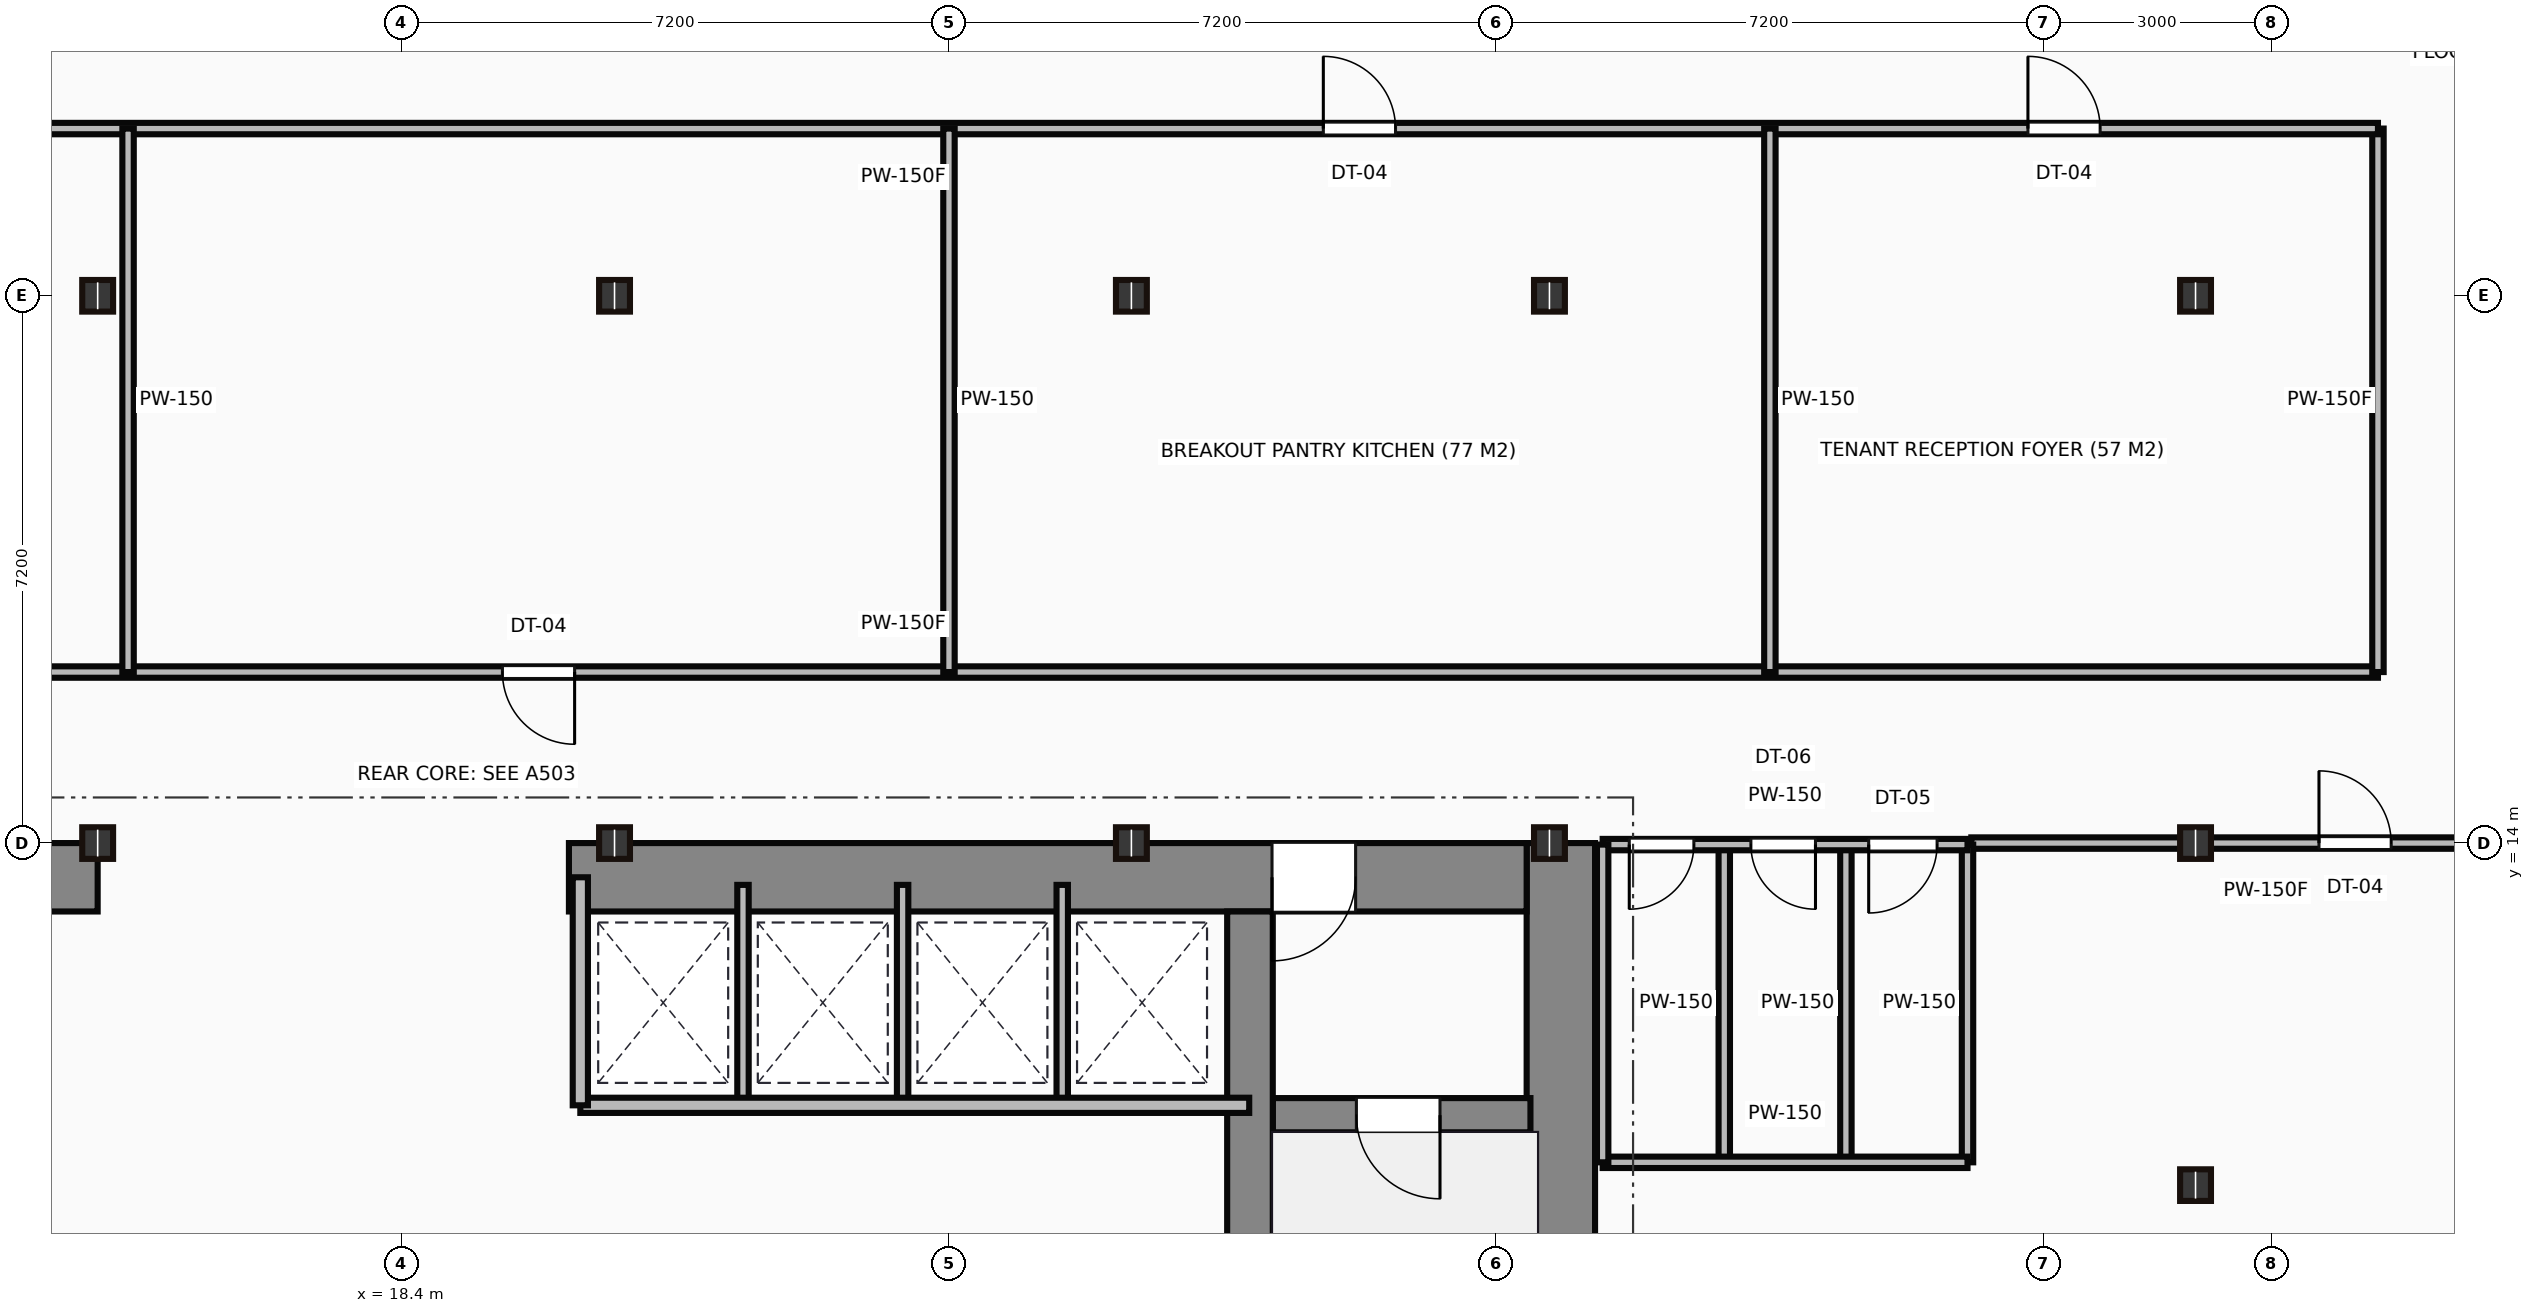
"""IFC4 building model, lengths in metres.
Left out: names, types, materials, properties, quantities, classifications, styles, units other than length and angle.
Written with IfcOpenShell. Run it as: python <this file> out.ifc"""

import sys

from ifc_helpers import new_model, si_unit, direction, frame, frame_2d, origin, origin_2d, place, context, subcontext, project, spatial, rectangle, i_section, extrude, source, transform, mapped, element, fill, save


model = new_model("IFC4")
c1 = context("Model", 3, precision=1e-05, world=origin(), true_north=direction((0.0, 1.0)))
c2 = subcontext(c1, "Body", "Model", "MODEL_VIEW")
j1 = project(units=[si_unit("LENGTHUNIT", "METRE"), si_unit("PLANEANGLEUNIT", "RADIAN")], contexts=[c1])
p1 = place(None, origin())
s1 = spatial("IfcSite", under=j1, at=p1, CompositionType="ELEMENT")
p2 = place(p1, origin())
s2 = spatial("IfcBuilding", under=s1, at=p2, CompositionType="ELEMENT")
p3 = place(p2, frame((0.0, 0.0, 69.0)))
s3 = spatial("IfcBuildingStorey", under=s2, at=p3, CompositionType="ELEMENT", Elevation=69.0)
m1 = source(origin(), c2, "Body", "SweptSolid", [
    extrude(rectangle(XDim=13.1, YDim=0.9, at=frame_2d((6.55, 0.0))), origin(), (0.0, 0.0, 1.0), 3.65),
])
p4 = place(p3, frame((33.65, 0.9, 0.0), z_axis=(0.0, 0.0, 1.0), x_axis=(0.0, 1.0, 0.0)))
e1 = element("IfcWall", 1, at=p4, inside=s3, PredefinedType="SHEAR", context=c2, shape_type="MappedRepresentation", body=[
    mapped(m1, transform((0.0, 0.0, 0.0))),
])
m2 = source(origin(), c2, "Body", "SweptSolid", [
    extrude(rectangle(XDim=9.1, YDim=0.9, at=frame_2d((4.55, 0.0))), origin(), (0.0, 0.0, 1.0), 3.65),
])
p5 = place(p3, frame((5.3, 13.55, 0.0), z_axis=(0.0, 0.0, 1.0), x_axis=(1.0, 0.0, 0.0)))
e2 = element("IfcWall", 2, at=p5, inside=s3, PredefinedType="SHEAR", context=c2, shape_type="MappedRepresentation", body=[
    mapped(m2, transform((0.0, 0.0, 0.0))),
])
p6 = place(p5, frame((4.1, 0.0, 0.0)))
e3 = element("IfcOpeningElement", 3, at=p6, cuts=e2, PredefinedType="OPENING", context=c2, shape_type="SweptSolid", body=[
    extrude(rectangle(XDim=1.1, YDim=2.15, at=frame_2d((0.55, 1.075))), frame((0.0, 0.46, 0.0), z_axis=(0.0, -1.0, 0.0), x_axis=(1.0, 0.0, 0.0)), (0.0, 0.0, 1.0), 0.92),
])
m3 = source(origin(), c2, "Body", "SweptSolid", [
    extrude(rectangle(XDim=12.6, YDim=0.9, at=frame_2d((6.3, 0.0))), origin(), (0.0, 0.0, 1.0), 3.65),
])
p7 = place(p3, frame((20.6, 13.55, 0.0), z_axis=(0.0, 0.0, 1.0), x_axis=(1.0, 0.0, 0.0)))
e4 = element("IfcWall", 4, at=p7, inside=s3, PredefinedType="SHEAR", context=c2, shape_type="MappedRepresentation", body=[
    mapped(m3, transform((0.0, 0.0, 0.0))),
])
p8 = place(p7, frame((9.25, 0.0, 0.0)))
e5 = element("IfcOpeningElement", 5, at=p8, cuts=e4, PredefinedType="OPENING", context=c2, shape_type="SweptSolid", body=[
    extrude(rectangle(XDim=1.1, YDim=2.15, at=frame_2d((0.55, 1.075))), frame((0.0, 0.46, 0.0), z_axis=(0.0, -1.0, 0.0), x_axis=(1.0, 0.0, 0.0)), (0.0, 0.0, 1.0), 0.92),
])
m4 = source(origin(), c2, "Body", "SweptSolid", [
    extrude(rectangle(XDim=12.2, YDim=0.6, at=frame_2d((6.1, 0.0))), origin(), (0.0, 0.0, 1.0), 3.65),
])
p9 = place(p3, frame((29.56, 0.9, 0.0), z_axis=(0.0, 0.0, 1.0), x_axis=(0.0, 1.0, 0.0)))
e6 = element("IfcWall", 6, at=p9, inside=s3, PredefinedType="SHEAR", context=c2, shape_type="MappedRepresentation", body=[
    mapped(m4, transform((0.0, 0.0, 0.0))),
])
m5 = source(origin(), c2, "Body", "SweptSolid", [
    extrude(rectangle(XDim=3.39, YDim=0.45, at=frame_2d((1.695, 0.0))), origin(), (0.0, 0.0, 1.0), 3.65),
])
p10 = place(p3, frame((29.86, 10.42, 0.0), z_axis=(0.0, 0.0, 1.0), x_axis=(1.0, 0.0, 0.0)))
e7 = element("IfcWall", 7, at=p10, inside=s3, PredefinedType="SHEAR", context=c2, shape_type="MappedRepresentation", body=[
    mapped(m5, transform((0.0, 0.0, 0.0))),
])
p11 = place(p10, frame((1.1, 0.0, 0.0)))
e8 = element("IfcOpeningElement", 8, at=p11, cuts=e7, PredefinedType="OPENING", context=c2, shape_type="SweptSolid", body=[
    extrude(rectangle(XDim=1.1, YDim=2.15, at=frame_2d((0.55, 1.075))), frame((0.0, 0.235, 0.0), z_axis=(0.0, -1.0, 0.0), x_axis=(1.0, 0.0, 0.0)), (0.0, 0.0, 1.0), 0.47),
])
m6 = source(origin(), c2, "Body", "SweptSolid", [
    extrude(i_section(OverallWidth=0.406, OverallDepth=0.416, WebThickness=0.03, FlangeThickness=0.048, at=origin_2d()), origin(), (0.0, 0.0, 1.0), 3.65),
])
for number, where, z_axis, x_axis in (
    (9, (14.4, 14.0, 0.0), (0.0, 0.0, 1.0), (1.0, 0.0, 0.0)),
    (10, (14.4, 21.2, 0.0), (0.0, 0.0, 1.0), (1.0, 0.0, 0.0)),
    (11, (21.2, 14.0, 0.0), (0.0, 0.0, 1.0), (1.0, 0.0, 0.0)),
    (12, (21.2, 21.2, 0.0), (0.0, 0.0, 1.0), (1.0, 0.0, 0.0)),
    (13, (28.0, 14.0, 0.0), (0.0, 0.0, 1.0), (1.0, 0.0, 0.0)),
    (14, (28.0, 21.2, 0.0), (0.0, 0.0, 1.0), (1.0, 0.0, 0.0)),
    (15, (33.5, 14.0, 0.0), (0.0, 0.0, 1.0), (1.0, 0.0, 0.0)),
    (16, (33.5, 21.2, 0.0), (0.0, 0.0, 1.0), (1.0, 0.0, 0.0)),
    (17, (42.0, 9.5, 0.0), (0.0, 0.0, 1.0), (1.0, 0.0, 0.0)),
    (18, (42.0, 14.0, 0.0), (0.0, 0.0, 1.0), (1.0, 0.0, 0.0)),
    (19, (42.0, 21.2, 0.0), (0.0, 0.0, 1.0), (1.0, 0.0, 0.0)),
):
    element("IfcColumn", number, at=place(p3, frame(where, z_axis=z_axis, x_axis=x_axis)), inside=s3, PredefinedType="COLUMN", context=c2, shape_type="MappedRepresentation", body=[
        mapped(m6, transform((0.0, 0.0, 0.0))),
    ])
m7 = source(origin(), c2, "Body", "SweptSolid", [
    extrude(rectangle(XDim=8.8, YDim=0.2, at=frame_2d((4.4, 0.0))), origin(), (0.0, 0.0, 1.0), 3.4),
])
p12 = place(p3, frame((20.75, 10.55, 0.0), z_axis=(0.0, 0.0, 1.0), x_axis=(1.0, 0.0, 0.0)))
e20 = element("IfcWall", 20, at=p12, inside=s3, PredefinedType="PARTITIONING", context=c2, shape_type="MappedRepresentation", body=[
    mapped(m7, transform((0.0, 0.0, 0.0))),
])
m8 = source(origin(), c2, "Body", "SweptSolid", [
    extrude(rectangle(XDim=3.0, YDim=0.2, at=frame_2d((1.5, 0.0))), origin(), (0.0, 0.0, 1.0), 3.4),
])
p13 = place(p3, frame((20.75, 10.55, 0.0), z_axis=(0.0, 0.0, 1.0), x_axis=(0.0, 1.0, 0.0)))
e21 = element("IfcWall", 21, at=p13, inside=s3, PredefinedType="PARTITIONING", context=c2, shape_type="MappedRepresentation", body=[
    mapped(m8, transform((0.0, 0.0, 0.0))),
])
m9 = source(origin(), c2, "Body", "SweptSolid", [
    extrude(rectangle(XDim=2.85, YDim=0.15, at=frame_2d((1.425, 0.0))), origin(), (0.0, 0.0, 1.0), 3.4),
])
for number, where, z_axis, x_axis in (
    (22, (22.89, 10.6, 0.0), (0.0, 0.0, 1.0), (0.0, 1.0, 0.0)),
    (23, (24.99, 10.6, 0.0), (0.0, 0.0, 1.0), (0.0, 1.0, 0.0)),
    (24, (27.09, 10.6, 0.0), (0.0, 0.0, 1.0), (0.0, 1.0, 0.0)),
):
    element("IfcWall", number, at=place(p3, frame(where, z_axis=z_axis, x_axis=x_axis)), inside=s3, PredefinedType="PARTITIONING", context=c2, shape_type="MappedRepresentation", body=[
        mapped(m9, transform((0.0, 0.0, 0.0))),
    ])
m10 = source(origin(), c2, "Body", "SweptSolid", [
    extrude(rectangle(XDim=4.8, YDim=0.15, at=frame_2d((2.4, 0.0))), origin(), (0.0, 0.0, 1.0), 2.625),
])
p14 = place(p3, frame((34.2, 13.98, 0.0), z_axis=(0.0, 0.0, 1.0), x_axis=(1.0, 0.0, 0.0)))
e25 = element("IfcWall", 25, at=p14, inside=s3, PredefinedType="PARTITIONING", context=c2, shape_type="MappedRepresentation", body=[
    mapped(m10, transform((0.0, 0.0, 0.0))),
])
p15 = place(p14, frame((0.35, 0.0, 0.0)))
e26 = element("IfcOpeningElement", 26, at=p15, cuts=e25, PredefinedType="OPENING", context=c2, shape_type="SweptSolid", body=[
    extrude(rectangle(XDim=0.85, YDim=2.1, at=frame_2d((0.425, 1.05))), frame((0.0, 0.085, 0.0), z_axis=(0.0, -1.0, 0.0), x_axis=(1.0, 0.0, 0.0)), (0.0, 0.0, 1.0), 0.17),
])
p16 = place(p14, frame((1.95, 0.0, 0.0)))
e27 = element("IfcOpeningElement", 27, at=p16, cuts=e25, PredefinedType="OPENING", context=c2, shape_type="SweptSolid", body=[
    extrude(rectangle(XDim=0.85, YDim=2.1, at=frame_2d((0.425, 1.05))), frame((0.0, 0.085, 0.0), z_axis=(0.0, -1.0, 0.0), x_axis=(1.0, 0.0, 0.0)), (0.0, 0.0, 1.0), 0.17),
])
p17 = place(p14, frame((3.5, 0.0, 0.0)))
e28 = element("IfcOpeningElement", 28, at=p17, cuts=e25, PredefinedType="OPENING", context=c2, shape_type="SweptSolid", body=[
    extrude(rectangle(XDim=0.9, YDim=2.1, at=frame_2d((0.45, 1.05))), frame((0.0, 0.085, 0.0), z_axis=(0.0, -1.0, 0.0), x_axis=(1.0, 0.0, 0.0)), (0.0, 0.0, 1.0), 0.17),
])
m11 = source(origin(), c2, "Body", "SweptSolid", [
    extrude(rectangle(XDim=4.8, YDim=0.15, at=frame_2d((2.4, 0.0))), origin(), (0.0, 0.0, 1.0), 3.4),
])
p18 = place(p3, frame((34.2, 9.8, 0.0), z_axis=(0.0, 0.0, 1.0), x_axis=(1.0, 0.0, 0.0)))
e29 = element("IfcWall", 29, at=p18, inside=s3, PredefinedType="PARTITIONING", context=c2, shape_type="MappedRepresentation", body=[
    mapped(m11, transform((0.0, 0.0, 0.0))),
])
m12 = source(origin(), c2, "Body", "SweptSolid", [
    extrude(rectangle(XDim=4.18, YDim=0.15, at=frame_2d((2.09, 0.0))), origin(), (0.0, 0.0, 1.0), 3.4),
])
for number, where, z_axis, x_axis in (
    (30, (39.0, 9.8, 0.0), (0.0, 0.0, 1.0), (0.0, 1.0, 0.0)),
    (31, (34.2, 9.8, 0.0), (0.0, 0.0, 1.0), (0.0, 1.0, 0.0)),
    (32, (35.8, 9.8, 0.0), (0.0, 0.0, 1.0), (0.0, 1.0, 0.0)),
    (33, (37.4, 9.8, 0.0), (0.0, 0.0, 1.0), (0.0, 1.0, 0.0)),
):
    element("IfcWall", number, at=place(p3, frame(where, z_axis=z_axis, x_axis=x_axis)), inside=s3, PredefinedType="PARTITIONING", context=c2, shape_type="MappedRepresentation", body=[
        mapped(m12, transform((0.0, 0.0, 0.0))),
    ])
m13 = source(origin(), c2, "Body", "SweptSolid", [
    extrude(rectangle(XDim=7.75, YDim=0.15, at=frame_2d((3.875, 0.0))), origin(), (0.0, 0.0, 1.0), 2.625),
])
p19 = place(p3, frame((46.8, 14.0, 0.0), z_axis=(0.0, 0.0, 1.0), x_axis=(-1.0, 0.0, 0.0)))
e34 = element("IfcWall", 34, at=p19, inside=s3, PredefinedType="PARTITIONING", context=c2, shape_type="MappedRepresentation", body=[
    mapped(m13, transform((0.0, 0.0, 0.0))),
])
p20 = place(p19, frame((2.226, 0.0, 0.0)))
e35 = element("IfcOpeningElement", 35, at=p20, cuts=e34, PredefinedType="OPENING", context=c2, shape_type="SweptSolid", body=[
    extrude(rectangle(XDim=0.95, YDim=2.15, at=frame_2d((0.475, 1.075))), frame((0.0, 0.085, 0.0), z_axis=(0.0, -1.0, 0.0), x_axis=(1.0, 0.0, 0.0)), (0.0, 0.0, 1.0), 0.17),
])
m14 = source(origin(), c2, "Body", "SweptSolid", [
    extrude(rectangle(XDim=38.8, YDim=0.15, at=frame_2d((19.4, 0.0))), origin(), (0.0, 0.0, 1.0), 3.4),
])
p21 = place(p3, frame((5.6, 16.25, 0.0), z_axis=(0.0, 0.0, 1.0), x_axis=(1.0, 0.0, 0.0)))
e36 = element("IfcWall", 36, at=p21, inside=s3, PredefinedType="PARTITIONING", context=c2, shape_type="MappedRepresentation", body=[
    mapped(m14, transform((0.0, 0.0, 0.0))),
])
p22 = place(p21, frame((4.255, 0.0, 0.0)))
e37 = element("IfcOpeningElement", 37, at=p22, cuts=e36, PredefinedType="OPENING", context=c2, shape_type="SweptSolid", body=[
    extrude(rectangle(XDim=0.95, YDim=2.15, at=frame_2d((0.475, 1.075))), frame((0.0, 0.085, 0.0), z_axis=(0.0, -1.0, 0.0), x_axis=(1.0, 0.0, 0.0)), (0.0, 0.0, 1.0), 0.17),
])
p23 = place(p21, frame((14.125, 0.0, 0.0)))
e38 = element("IfcOpeningElement", 38, at=p23, cuts=e36, PredefinedType="OPENING", context=c2, shape_type="SweptSolid", body=[
    extrude(rectangle(XDim=0.95, YDim=2.15, at=frame_2d((0.475, 1.075))), frame((0.0, 0.085, 0.0), z_axis=(0.0, -1.0, 0.0), x_axis=(1.0, 0.0, 0.0)), (0.0, 0.0, 1.0), 0.17),
])
m15 = source(origin(), c2, "Body", "SweptSolid", [
    extrude(rectangle(XDim=7.15, YDim=0.15, at=frame_2d((3.575, 0.0))), origin(), (0.0, 0.0, 1.0), 3.4),
])
p24 = place(p3, frame((44.4, 16.25, 0.0), z_axis=(0.0, 0.0, 1.0), x_axis=(0.0, 1.0, 0.0)))
e39 = element("IfcWall", 39, at=p24, inside=s3, PredefinedType="PARTITIONING", context=c2, shape_type="MappedRepresentation", body=[
    mapped(m15, transform((0.0, 0.0, 0.0))),
])
m16 = source(origin(), c2, "Body", "SweptSolid", [
    extrude(rectangle(XDim=38.8, YDim=0.15, at=frame_2d((19.4, 0.0))), origin(), (0.0, 0.0, 1.0), 2.978),
])
p25 = place(p3, frame((44.4, 23.4, 0.0), z_axis=(0.0, 0.0, 1.0), x_axis=(-1.0, 0.0, 0.0)))
e40 = element("IfcWall", 40, at=p25, inside=s3, PredefinedType="PARTITIONING", context=c2, shape_type="MappedRepresentation", body=[
    mapped(m16, transform((0.0, 0.0, 0.0))),
])
p26 = place(p25, frame((12.925, 0.0, 0.0)))
e41 = element("IfcOpeningElement", 41, at=p26, cuts=e40, PredefinedType="OPENING", context=c2, shape_type="SweptSolid", body=[
    extrude(rectangle(XDim=0.95, YDim=2.15, at=frame_2d((0.475, 1.075))), frame((0.0, 0.085, 0.0), z_axis=(0.0, -1.0, 0.0), x_axis=(1.0, 0.0, 0.0)), (0.0, 0.0, 1.0), 0.17),
])
p27 = place(p25, frame((3.655, 0.0, 0.0)))
e42 = element("IfcOpeningElement", 42, at=p27, cuts=e40, PredefinedType="OPENING", context=c2, shape_type="SweptSolid", body=[
    extrude(rectangle(XDim=0.95, YDim=2.15, at=frame_2d((0.475, 1.075))), frame((0.0, 0.085, 0.0), z_axis=(0.0, -1.0, 0.0), x_axis=(1.0, 0.0, 0.0)), (0.0, 0.0, 1.0), 0.17),
])
for number, where, z_axis, x_axis in (
    (43, (14.8, 23.4, 0.0), (0.0, 0.0, 1.0), (0.0, -1.0, 0.0)),
    (44, (25.6, 23.4, 0.0), (0.0, 0.0, 1.0), (0.0, -1.0, 0.0)),
    (45, (36.4, 23.4, 0.0), (0.0, 0.0, 1.0), (0.0, -1.0, 0.0)),
):
    element("IfcWall", number, at=place(p3, frame(where, z_axis=z_axis, x_axis=x_axis)), inside=s3, PredefinedType="PARTITIONING", context=c2, shape_type="MappedRepresentation", body=[
        mapped(m15, transform((0.0, 0.0, 0.0))),
    ])
m17 = source(origin(), c2, "Body", "SweptSolid", [
    extrude(rectangle(XDim=1.1, YDim=2.15, at=frame_2d((0.55, 1.075))), frame((0.0, 0.025, 0.0), z_axis=(0.0, -1.0, 0.0), x_axis=(1.0, 0.0, 0.0)), (0.0, 0.0, 1.0), 0.05),
])
p28 = place(p11, frame((1.1, 0.0, 0.0), z_axis=(0.0, 0.0, 1.0), x_axis=(-1.0, 0.0, 0.0)))
e46 = element("IfcDoor", 46, at=p28, inside=s3, OperationType="SINGLE_SWING_RIGHT", PredefinedType="DOOR", context=c2, shape_type="MappedRepresentation", body=[
    mapped(m17, transform((0.0, 0.0, 0.0))),
])
fill(e8, e46)
p29 = place(p8, origin())
e47 = element("IfcDoor", 47, at=p29, inside=s3, OperationType="SINGLE_SWING_LEFT", PredefinedType="DOOR", context=c2, shape_type="MappedRepresentation", body=[
    mapped(m17, transform((0.0, 0.0, 0.0))),
])
fill(e5, e47)
m18 = source(origin(), c2, "Body", "SweptSolid", [
    extrude(rectangle(XDim=0.85, YDim=2.1, at=frame_2d((0.425, 1.05))), frame((0.0, 0.025, 0.0), z_axis=(0.0, -1.0, 0.0), x_axis=(1.0, 0.0, 0.0)), (0.0, 0.0, 1.0), 0.05),
])
p30 = place(p15, frame((0.85, 0.0, 0.0), z_axis=(0.0, 0.0, 1.0), x_axis=(-1.0, 0.0, 0.0)))
e48 = element("IfcDoor", 48, at=p30, inside=s3, OperationType="SINGLE_SWING_LEFT", PredefinedType="DOOR", context=c2, shape_type="MappedRepresentation", body=[
    mapped(m18, transform((0.0, 0.0, 0.0))),
])
fill(e26, e48)
p31 = place(p16, frame((0.85, 0.0, 0.0), z_axis=(0.0, 0.0, 1.0), x_axis=(-1.0, 0.0, 0.0)))
e49 = element("IfcDoor", 49, at=p31, inside=s3, OperationType="SINGLE_SWING_RIGHT", PredefinedType="DOOR", context=c2, shape_type="MappedRepresentation", body=[
    mapped(m18, transform((0.0, 0.0, 0.0))),
])
fill(e27, e49)
m19 = source(origin(), c2, "Body", "SweptSolid", [
    extrude(rectangle(XDim=0.9, YDim=2.1, at=frame_2d((0.45, 1.05))), frame((0.0, 0.025, 0.0), z_axis=(0.0, -1.0, 0.0), x_axis=(1.0, 0.0, 0.0)), (0.0, 0.0, 1.0), 0.05),
])
p32 = place(p17, frame((0.9, 0.0, 0.0), z_axis=(0.0, 0.0, 1.0), x_axis=(-1.0, 0.0, 0.0)))
e50 = element("IfcDoor", 50, at=p32, inside=s3, OperationType="SINGLE_SWING_LEFT", PredefinedType="DOOR", context=c2, shape_type="MappedRepresentation", body=[
    mapped(m19, transform((0.0, 0.0, 0.0))),
])
fill(e28, e50)
m20 = source(origin(), c2, "Body", "SweptSolid", [
    extrude(rectangle(XDim=0.95, YDim=2.15, at=frame_2d((0.475, 1.075))), frame((0.0, 0.025, 0.0), z_axis=(0.0, -1.0, 0.0), x_axis=(1.0, 0.0, 0.0)), (0.0, 0.0, 1.0), 0.05),
])
p33 = place(p23, origin())
e51 = element("IfcDoor", 51, at=p33, inside=s3, OperationType="SINGLE_SWING_RIGHT", PredefinedType="DOOR", context=c2, shape_type="MappedRepresentation", body=[
    mapped(m20, transform((0.0, 0.0, 0.0))),
])
fill(e38, e51)
p34 = place(p26, origin())
e52 = element("IfcDoor", 52, at=p34, inside=s3, OperationType="SINGLE_SWING_RIGHT", PredefinedType="DOOR", context=c2, shape_type="MappedRepresentation", body=[
    mapped(m20, transform((0.0, 0.0, 0.0))),
])
fill(e41, e52)
p35 = place(p27, origin())
e53 = element("IfcDoor", 53, at=p35, inside=s3, OperationType="SINGLE_SWING_RIGHT", PredefinedType="DOOR", context=c2, shape_type="MappedRepresentation", body=[
    mapped(m20, transform((0.0, 0.0, 0.0))),
])
fill(e42, e53)
p36 = place(p20, origin())
e54 = element("IfcDoor", 54, at=p36, inside=s3, OperationType="SINGLE_SWING_RIGHT", PredefinedType="DOOR", context=c2, shape_type="MappedRepresentation", body=[
    mapped(m20, transform((0.0, 0.0, 0.0))),
])
fill(e35, e54)
save(model, sys.argv[1])
